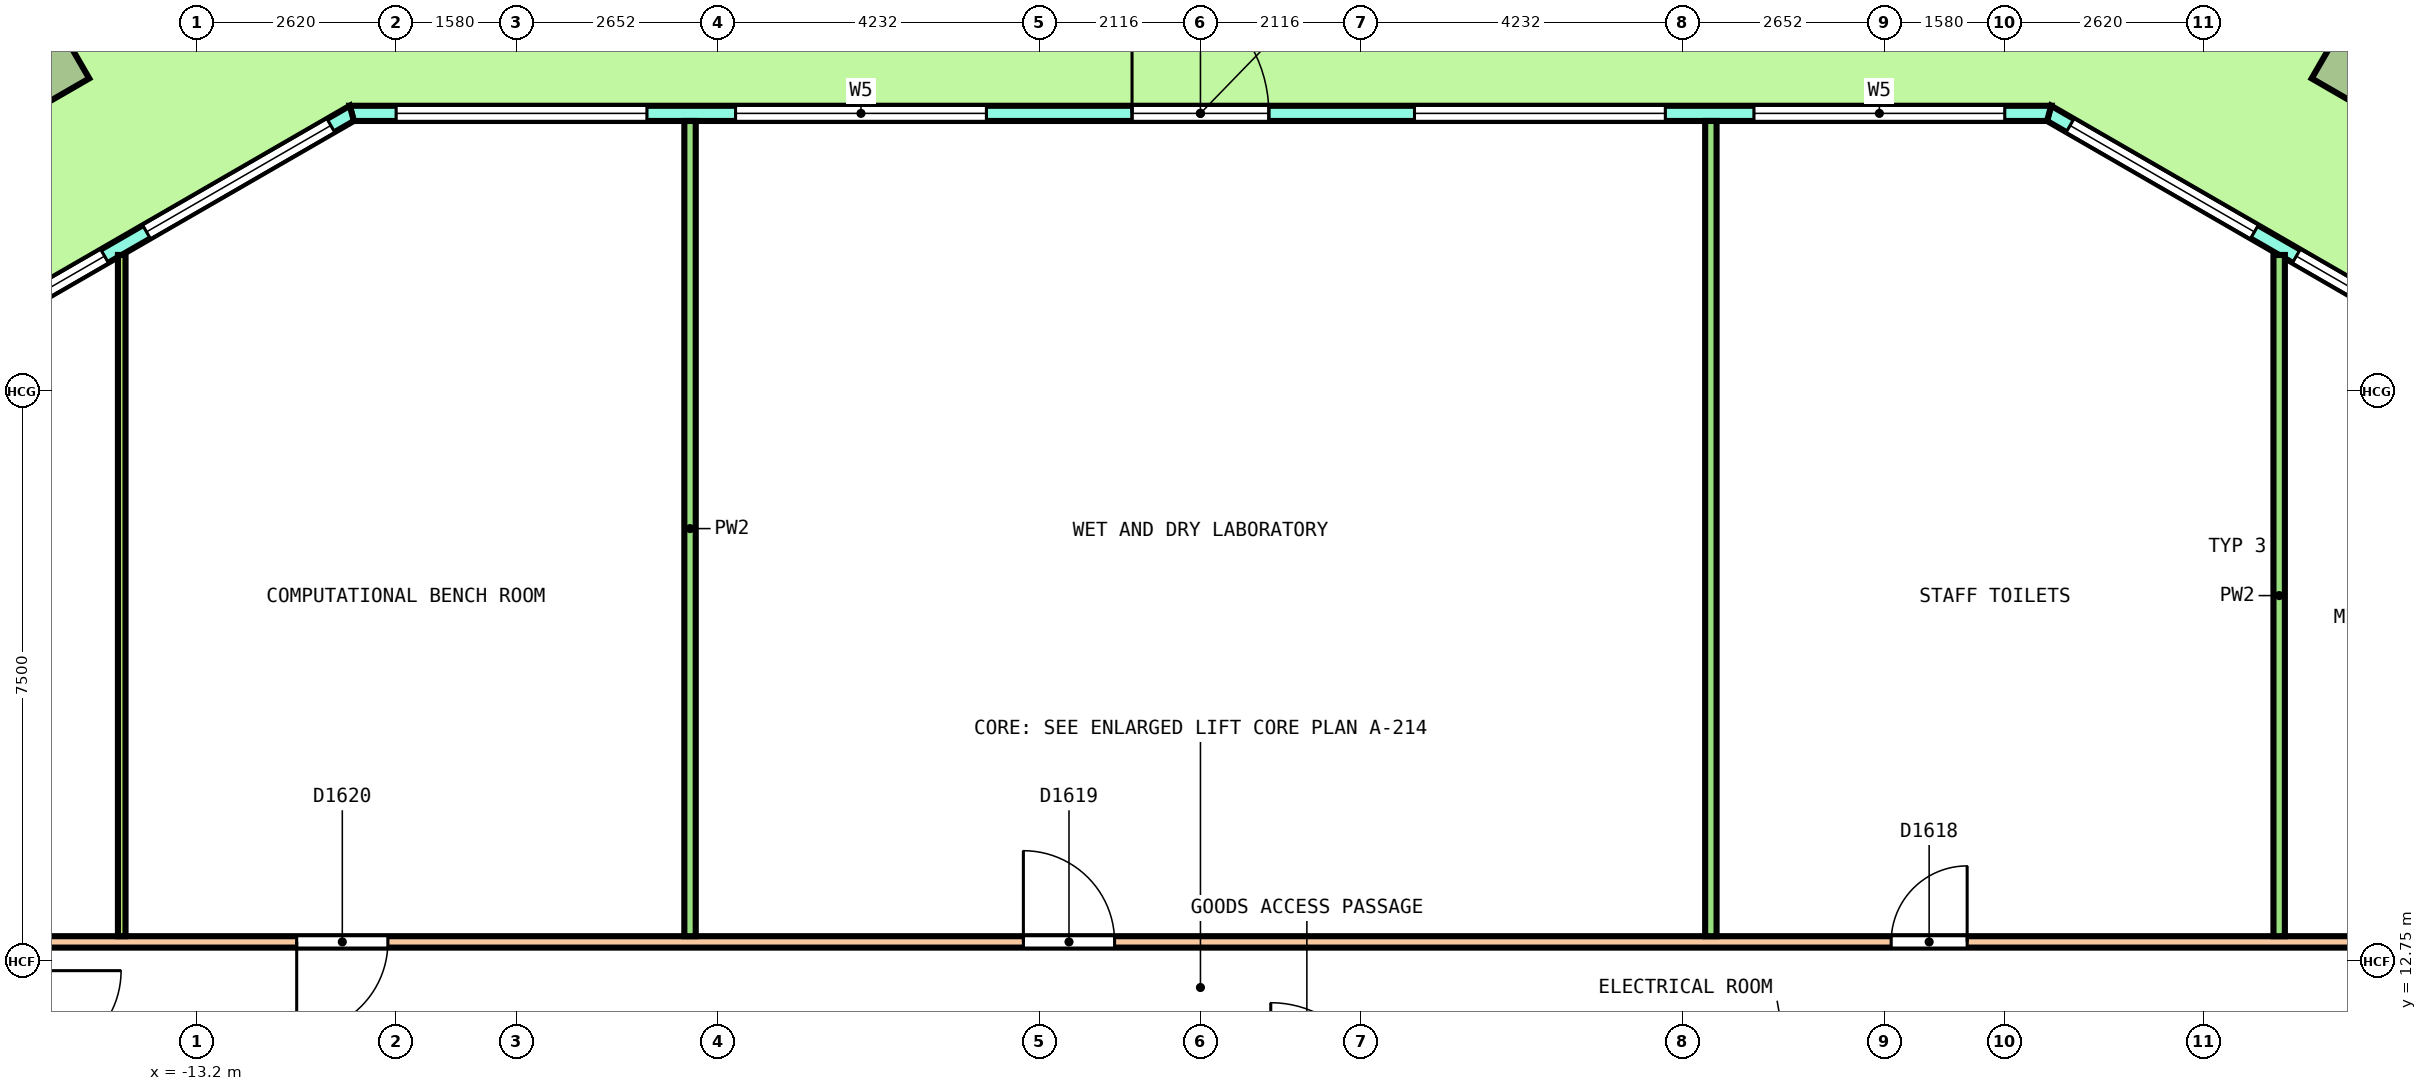
"""IFC4 building model, lengths in metres.
Left out: names, types, materials, properties, quantities, classifications, styles, units other than length and angle.
Written with IfcOpenShell. Run it as: python <this file> out.ifc"""

import sys

from ifc_helpers import new_model, si_unit, direction, frame, frame_2d, origin, origin_2d, place, context, subcontext, project, spatial, polyline, rectangle, outline, extrude, element, fill, save


model = new_model("IFC4")
c1 = context("Model", 3, precision=1e-05, world=origin(), true_north=direction((0.0, 1.0)))
c2 = subcontext(c1, "Body", "Model", "MODEL_VIEW")
j1 = project(units=[si_unit("LENGTHUNIT", "METRE"), si_unit("PLANEANGLEUNIT", "RADIAN")], contexts=[c1])
p1 = place(None, origin())
s1 = spatial("IfcSite", under=j1, at=p1, CompositionType="ELEMENT")
p2 = place(p1, origin())
s2 = spatial("IfcBuilding", under=s1, at=p2, CompositionType="ELEMENT")
p3 = place(p2, frame((0.0, 0.0, 117.6)))
s3 = spatial("IfcBuildingStorey", under=s2, at=p3, CompositionType="ELEMENT", Elevation=117.6)
for number, where, z_axis, x_axis in (
    (1, (15.542, 24.606, 0.0), (0.036, 0.0, 0.999), (-0.865, 0.5, 0.031)),
    (2, (-15.542, 24.606, 0.0), (-0.036, 0.0, 0.999), (-0.865, -0.5, -0.031)),
):
    element("IfcColumn", number, at=place(p3, frame(where, z_axis=z_axis, x_axis=x_axis)), inside=s3, PredefinedType="COLUMN", context=c2, shape_type="SweptSolid", body=[
        extrude(rectangle(XDim=1.35, YDim=1.35, at=origin_2d()), origin(), (0.0, 0.0, 1.0), 4.052),
    ])
p4 = place(p3, frame((17.119, 20.463, 0.0), z_axis=(0.0, 0.0, 1.0), x_axis=(-0.866029458321, 0.49999297727, 0.0)))
e3 = element("IfcWall", 3, at=p4, inside=s3, PredefinedType="SOLIDWALL", context=c2, shape_type="SweptSolid", body=[
    extrude(outline(polyline([(-0.027, -0.1), (1.128, -0.1), (2.282, -0.1), (3.437, -0.1), (4.592, -0.1), (5.747, -0.1), (6.901, -0.1), (6.848, 0.1), (5.711, 0.1), (4.574, 0.1), (3.437, 0.1), (2.301, 0.1), (1.164, 0.1), (0.027, 0.1), (-0.027, -0.1)])), origin(), (0.0, 0.0, 1.0), 4.1),
])
p5 = place(p4, frame((0.319, 0.0, 0.1)))
e4 = element("IfcOpeningElement", 4, at=p5, cuts=e3, PredefinedType="OPENING", context=c2, shape_type="SweptSolid", body=[
    extrude(rectangle(XDim=2.8, YDim=2.9, at=frame_2d((1.4, 1.45))), frame((0.0, 0.11, 0.0), z_axis=(0.0, -1.0, 0.0), x_axis=(1.0, 0.0, 0.0)), (0.0, 0.0, 1.0), 0.22),
])
p6 = place(p4, frame((3.756, 0.0, 0.1)))
e5 = element("IfcOpeningElement", 5, at=p6, cuts=e3, PredefinedType="OPENING", context=c2, shape_type="SweptSolid", body=[
    extrude(rectangle(XDim=2.8, YDim=2.9, at=frame_2d((1.4, 1.45))), frame((0.0, 0.11, 0.0), z_axis=(0.0, -1.0, 0.0), x_axis=(1.0, 0.0, 0.0)), (0.0, 0.0, 1.0), 0.22),
])
p7 = place(p3, frame((11.165, 23.9, 0.0), z_axis=(0.0, 0.0, 1.0), x_axis=(-1.0, 0.0, 0.0)))
e6 = element("IfcWall", 6, at=p7, inside=s3, PredefinedType="SOLIDWALL", context=c2, shape_type="SweptSolid", body=[
    extrude(outline(polyline([(-0.027, -0.1), (0.99, -0.1), (2.008, -0.1), (3.025, -0.1), (4.043, -0.1), (5.06, -0.1), (6.078, -0.1), (7.095, -0.1), (8.113, -0.1), (9.13, -0.1), (10.148, -0.1), (11.165, -0.1), (12.182, -0.1), (13.2, -0.1), (14.217, -0.1), (15.235, -0.1), (16.252, -0.1), (17.27, -0.1), (18.287, -0.1), (19.305, -0.1), (20.322, -0.1), (21.34, -0.1), (22.357, -0.1), (22.303, 0.1), (21.291, 0.1), (20.278, 0.1), (19.266, 0.1), (18.253, 0.1), (17.24, 0.1), (16.228, 0.1), (15.215, 0.1), (14.203, 0.1), (13.19, 0.1), (12.177, 0.1), (11.165, 0.1), (10.153, 0.1), (9.14, 0.1), (8.127, 0.1), (7.115, 0.1), (6.102, 0.1), (5.09, 0.1), (4.077, 0.1), (3.064, 0.1), (2.052, 0.1), (1.039, 0.1), (0.027, 0.1), (-0.027, -0.1)])), origin(), (0.0, 0.0, 1.0), 4.1),
])
p8 = place(p7, frame((0.583, 0.0, 0.1)))
e7 = element("IfcOpeningElement", 7, at=p8, cuts=e6, PredefinedType="OPENING", context=c2, shape_type="SweptSolid", body=[
    extrude(rectangle(XDim=3.3, YDim=2.9, at=frame_2d((1.65, 1.45))), frame((0.0, 0.11, 0.0), z_axis=(0.0, -1.0, 0.0), x_axis=(1.0, 0.0, 0.0)), (0.0, 0.0, 1.0), 0.22),
])
p9 = place(p7, frame((5.049, 0.0, 0.1)))
e8 = element("IfcOpeningElement", 8, at=p9, cuts=e6, PredefinedType="OPENING", context=c2, shape_type="SweptSolid", body=[
    extrude(rectangle(XDim=3.3, YDim=2.9, at=frame_2d((1.65, 1.45))), frame((0.0, 0.11, 0.0), z_axis=(0.0, -1.0, 0.0), x_axis=(1.0, 0.0, 0.0)), (0.0, 0.0, 1.0), 0.22),
])
p10 = place(p7, frame((10.265, 0.0, 0.0)))
e9 = element("IfcOpeningElement", 9, at=p10, cuts=e6, PredefinedType="OPENING", context=c2, shape_type="SweptSolid", body=[
    extrude(rectangle(XDim=1.8, YDim=2.4, at=frame_2d((0.9, 1.2))), frame((0.0, 0.11, 0.0), z_axis=(0.0, -1.0, 0.0), x_axis=(1.0, 0.0, 0.0)), (0.0, 0.0, 1.0), 0.22),
])
p11 = place(p7, frame((10.265, 0.0, 2.55)))
e10 = element("IfcOpeningElement", 10, at=p11, cuts=e6, PredefinedType="OPENING", context=c2, shape_type="SweptSolid", body=[
    extrude(rectangle(XDim=1.8, YDim=0.45, at=frame_2d((0.9, 0.225))), frame((0.0, 0.11, 0.0), z_axis=(0.0, -1.0, 0.0), x_axis=(1.0, 0.0, 0.0)), (0.0, 0.0, 1.0), 0.22),
])
p12 = place(p7, frame((13.981, 0.0, 0.1)))
e11 = element("IfcOpeningElement", 11, at=p12, cuts=e6, PredefinedType="OPENING", context=c2, shape_type="SweptSolid", body=[
    extrude(rectangle(XDim=3.3, YDim=2.9, at=frame_2d((1.65, 1.45))), frame((0.0, 0.11, 0.0), z_axis=(0.0, -1.0, 0.0), x_axis=(1.0, 0.0, 0.0)), (0.0, 0.0, 1.0), 0.22),
])
p13 = place(p7, frame((18.447, 0.0, 0.1)))
e12 = element("IfcOpeningElement", 12, at=p13, cuts=e6, PredefinedType="OPENING", context=c2, shape_type="SweptSolid", body=[
    extrude(rectangle(XDim=3.3, YDim=2.9, at=frame_2d((1.65, 1.45))), frame((0.0, 0.11, 0.0), z_axis=(0.0, -1.0, 0.0), x_axis=(1.0, 0.0, 0.0)), (0.0, 0.0, 1.0), 0.22),
])
p14 = place(p3, frame((-11.165, 23.9, 0.0), z_axis=(0.0, 0.0, 1.0), x_axis=(-0.866029458321, -0.49999297727, 0.0)))
e13 = element("IfcWall", 13, at=p14, inside=s3, PredefinedType="SOLIDWALL", context=c2, shape_type="SweptSolid", body=[
    extrude(outline(polyline([(-0.027, -0.1), (1.128, -0.1), (2.282, -0.1), (3.437, -0.1), (4.592, -0.1), (5.747, -0.1), (6.901, -0.1), (6.848, 0.1), (5.711, 0.1), (4.574, 0.1), (3.437, 0.1), (2.301, 0.1), (1.164, 0.1), (0.027, 0.1), (-0.027, -0.1)])), origin(), (0.0, 0.0, 1.0), 4.1),
])
p15 = place(p14, frame((0.319, 0.0, 0.1)))
e14 = element("IfcOpeningElement", 14, at=p15, cuts=e13, PredefinedType="OPENING", context=c2, shape_type="SweptSolid", body=[
    extrude(rectangle(XDim=2.8, YDim=2.9, at=frame_2d((1.4, 1.45))), frame((0.0, 0.11, 0.0), z_axis=(0.0, -1.0, 0.0), x_axis=(1.0, 0.0, 0.0)), (0.0, 0.0, 1.0), 0.22),
])
p16 = place(p14, frame((3.756, 0.0, 0.1)))
e15 = element("IfcOpeningElement", 15, at=p16, cuts=e13, PredefinedType="OPENING", context=c2, shape_type="SweptSolid", body=[
    extrude(rectangle(XDim=2.8, YDim=2.9, at=frame_2d((1.4, 1.45))), frame((0.0, 0.11, 0.0), z_axis=(0.0, -1.0, 0.0), x_axis=(1.0, 0.0, 0.0)), (0.0, 0.0, 1.0), 0.22),
])
p17 = place(p3, frame((-15.325, 13.0, 0.0), z_axis=(0.0, 0.0, 1.0), x_axis=(1.0, 0.0, 0.0)))
e16 = element("IfcWall", 16, at=p17, inside=s3, PredefinedType="PARTITIONING", context=c2, shape_type="SweptSolid", body=[
    extrude(rectangle(XDim=30.65, YDim=0.15, at=frame_2d((15.325, 0.0))), origin(), (0.0, 0.0, 1.0), 3.05),
])
p18 = place(p17, frame((24.412, 0.0, 0.0)))
e17 = element("IfcOpeningElement", 17, at=p18, cuts=e16, PredefinedType="OPENING", context=c2, shape_type="SweptSolid", body=[
    extrude(rectangle(XDim=1.0, YDim=2.1, at=frame_2d((0.5, 1.05))), frame((0.0, 0.085, 0.0), z_axis=(0.0, -1.0, 0.0), x_axis=(1.0, 0.0, 0.0)), (0.0, 0.0, 1.0), 0.17),
])
p19 = place(p17, frame((12.996, 0.0, 0.0)))
e18 = element("IfcOpeningElement", 18, at=p19, cuts=e16, PredefinedType="OPENING", context=c2, shape_type="SweptSolid", body=[
    extrude(rectangle(XDim=1.2, YDim=2.1, at=frame_2d((0.6, 1.05))), frame((0.0, 0.085, 0.0), z_axis=(0.0, -1.0, 0.0), x_axis=(1.0, 0.0, 0.0)), (0.0, 0.0, 1.0), 0.17),
])
p20 = place(p17, frame((3.435, 0.0, 0.0)))
e19 = element("IfcOpeningElement", 19, at=p20, cuts=e16, PredefinedType="OPENING", context=c2, shape_type="SweptSolid", body=[
    extrude(rectangle(XDim=1.2, YDim=2.1, at=frame_2d((0.6, 1.05))), frame((0.0, 0.085, 0.0), z_axis=(0.0, -1.0, 0.0), x_axis=(1.0, 0.0, 0.0)), (0.0, 0.0, 1.0), 0.17),
])
p21 = place(p3, frame((14.192, 13.075, 0.0), z_axis=(0.0, 0.0, 1.0), x_axis=(0.0, 1.0, 0.0)))
e20 = element("IfcWall", 20, at=p21, inside=s3, PredefinedType="PARTITIONING", context=c2, shape_type="SweptSolid", body=[
    extrude(rectangle(XDim=8.962, YDim=0.15, at=frame_2d((4.481, 0.0))), origin(), (0.0, 0.0, 1.0), 3.05),
])
for number, where, z_axis, x_axis in (
    (21, (6.715, 13.075, 0.0), (0.0, 0.0, 1.0), (0.0, 1.0, 0.0)),
    (22, (-6.715, 13.075, 0.0), (0.0, 0.0, 1.0), (0.0, 1.0, 0.0)),
):
    element("IfcWall", number, at=place(p3, frame(where, z_axis=z_axis, x_axis=x_axis)), inside=s3, PredefinedType="PARTITIONING", context=c2, shape_type="SweptSolid", body=[
        extrude(rectangle(XDim=10.725, YDim=0.15, at=frame_2d((5.363, 0.0))), origin(), (0.0, 0.0, 1.0), 3.05),
    ])
p22 = place(p3, frame((-14.192, 13.075, 0.0), z_axis=(0.0, 0.0, 1.0), x_axis=(0.0, 1.0, 0.0)))
e23 = element("IfcWall", 23, at=p22, inside=s3, PredefinedType="PARTITIONING", context=c2, shape_type="SweptSolid", body=[
    extrude(rectangle(XDim=8.962, YDim=0.1, at=frame_2d((4.481, 0.0))), origin(), (0.0, 0.0, 1.0), 3.05),
])
p23 = place(p5, origin())
e24 = element("IfcWindow", 24, at=p23, inside=s3, PartitioningType="SINGLE_PANEL", PredefinedType="WINDOW", context=c2, shape_type="SweptSolid", body=[
    extrude(rectangle(XDim=2.8, YDim=2.9, at=frame_2d((1.4, 1.45))), frame((0.0, 0.03, 0.0), z_axis=(0.0, -1.0, 0.0), x_axis=(1.0, 0.0, 0.0)), (0.0, 0.0, 1.0), 0.06),
])
fill(e4, e24)
p24 = place(p6, origin())
e25 = element("IfcWindow", 25, at=p24, inside=s3, PartitioningType="SINGLE_PANEL", PredefinedType="WINDOW", context=c2, shape_type="SweptSolid", body=[
    extrude(rectangle(XDim=2.8, YDim=2.9, at=frame_2d((1.4, 1.45))), frame((0.0, 0.03, 0.0), z_axis=(0.0, -1.0, 0.0), x_axis=(1.0, 0.0, 0.0)), (0.0, 0.0, 1.0), 0.06),
])
fill(e5, e25)
p25 = place(p8, origin())
e26 = element("IfcWindow", 26, at=p25, inside=s3, PartitioningType="SINGLE_PANEL", PredefinedType="WINDOW", context=c2, shape_type="SweptSolid", body=[
    extrude(rectangle(XDim=3.3, YDim=2.9, at=frame_2d((1.65, 1.45))), frame((0.0, 0.03, 0.0), z_axis=(0.0, -1.0, 0.0), x_axis=(1.0, 0.0, 0.0)), (0.0, 0.0, 1.0), 0.06),
])
fill(e7, e26)
p26 = place(p9, origin())
e27 = element("IfcWindow", 27, at=p26, inside=s3, PartitioningType="SINGLE_PANEL", PredefinedType="WINDOW", context=c2, shape_type="SweptSolid", body=[
    extrude(rectangle(XDim=3.3, YDim=2.9, at=frame_2d((1.65, 1.45))), frame((0.0, 0.03, 0.0), z_axis=(0.0, -1.0, 0.0), x_axis=(1.0, 0.0, 0.0)), (0.0, 0.0, 1.0), 0.06),
])
fill(e8, e27)
p27 = place(p10, origin())
e28 = element("IfcDoor", 28, at=p27, inside=s3, OperationType="DOUBLE_DOOR_SINGLE_SWING", PredefinedType="DOOR", context=c2, shape_type="SweptSolid", body=[
    extrude(rectangle(XDim=1.8, YDim=2.4, at=frame_2d((0.9, 1.2))), frame((0.0, 0.025, 0.0), z_axis=(0.0, -1.0, 0.0), x_axis=(1.0, 0.0, 0.0)), (0.0, 0.0, 1.0), 0.05),
])
fill(e9, e28)
p28 = place(p11, origin())
e29 = element("IfcWindow", 29, at=p28, inside=s3, PartitioningType="SINGLE_PANEL", PredefinedType="WINDOW", context=c2, shape_type="SweptSolid", body=[
    extrude(rectangle(XDim=1.8, YDim=0.45, at=frame_2d((0.9, 0.225))), frame((0.0, 0.03, 0.0), z_axis=(0.0, -1.0, 0.0), x_axis=(1.0, 0.0, 0.0)), (0.0, 0.0, 1.0), 0.06),
])
fill(e10, e29)
p29 = place(p12, origin())
e30 = element("IfcWindow", 30, at=p29, inside=s3, PartitioningType="SINGLE_PANEL", PredefinedType="WINDOW", context=c2, shape_type="SweptSolid", body=[
    extrude(rectangle(XDim=3.3, YDim=2.9, at=frame_2d((1.65, 1.45))), frame((0.0, 0.03, 0.0), z_axis=(0.0, -1.0, 0.0), x_axis=(1.0, 0.0, 0.0)), (0.0, 0.0, 1.0), 0.06),
])
fill(e11, e30)
p30 = place(p13, origin())
e31 = element("IfcWindow", 31, at=p30, inside=s3, PartitioningType="SINGLE_PANEL", PredefinedType="WINDOW", context=c2, shape_type="SweptSolid", body=[
    extrude(rectangle(XDim=3.3, YDim=2.9, at=frame_2d((1.65, 1.45))), frame((0.0, 0.03, 0.0), z_axis=(0.0, -1.0, 0.0), x_axis=(1.0, 0.0, 0.0)), (0.0, 0.0, 1.0), 0.06),
])
fill(e12, e31)
p31 = place(p15, origin())
e32 = element("IfcWindow", 32, at=p31, inside=s3, PartitioningType="SINGLE_PANEL", PredefinedType="WINDOW", context=c2, shape_type="SweptSolid", body=[
    extrude(rectangle(XDim=2.8, YDim=2.9, at=frame_2d((1.4, 1.45))), frame((0.0, 0.03, 0.0), z_axis=(0.0, -1.0, 0.0), x_axis=(1.0, 0.0, 0.0)), (0.0, 0.0, 1.0), 0.06),
])
fill(e14, e32)
p32 = place(p16, origin())
e33 = element("IfcWindow", 33, at=p32, inside=s3, PartitioningType="SINGLE_PANEL", PredefinedType="WINDOW", context=c2, shape_type="SweptSolid", body=[
    extrude(rectangle(XDim=2.8, YDim=2.9, at=frame_2d((1.4, 1.45))), frame((0.0, 0.03, 0.0), z_axis=(0.0, -1.0, 0.0), x_axis=(1.0, 0.0, 0.0)), (0.0, 0.0, 1.0), 0.06),
])
fill(e15, e33)
p33 = place(p18, origin())
e34 = element("IfcDoor", 34, at=p33, inside=s3, OperationType="SINGLE_SWING_RIGHT", PredefinedType="DOOR", context=c2, shape_type="SweptSolid", body=[
    extrude(rectangle(XDim=1.0, YDim=2.1, at=frame_2d((0.5, 1.05))), frame((0.0, 0.025, 0.0), z_axis=(0.0, -1.0, 0.0), x_axis=(1.0, 0.0, 0.0)), (0.0, 0.0, 1.0), 0.05),
])
fill(e17, e34)
p34 = place(p19, origin())
e35 = element("IfcDoor", 35, at=p34, inside=s3, OperationType="DOUBLE_DOOR_SINGLE_SWING", PredefinedType="DOOR", context=c2, shape_type="SweptSolid", body=[
    extrude(rectangle(XDim=1.2, YDim=2.1, at=frame_2d((0.6, 1.05))), frame((0.0, 0.025, 0.0), z_axis=(0.0, -1.0, 0.0), x_axis=(1.0, 0.0, 0.0)), (0.0, 0.0, 1.0), 0.05),
])
fill(e18, e35)
p35 = place(p20, origin())
e36 = element("IfcDoor", 36, at=p35, inside=s3, OperationType="DOUBLE_DOOR_SINGLE_SWING", PredefinedType="DOOR", context=c2, shape_type="SweptSolid", body=[
    extrude(rectangle(XDim=1.2, YDim=2.1, at=frame_2d((0.6, 1.05))), frame((0.0, 0.025, 0.0), z_axis=(0.0, -1.0, 0.0), x_axis=(1.0, 0.0, 0.0)), (0.0, 0.0, 1.0), 0.05),
])
fill(e19, e36)
save(model, sys.argv[1])
